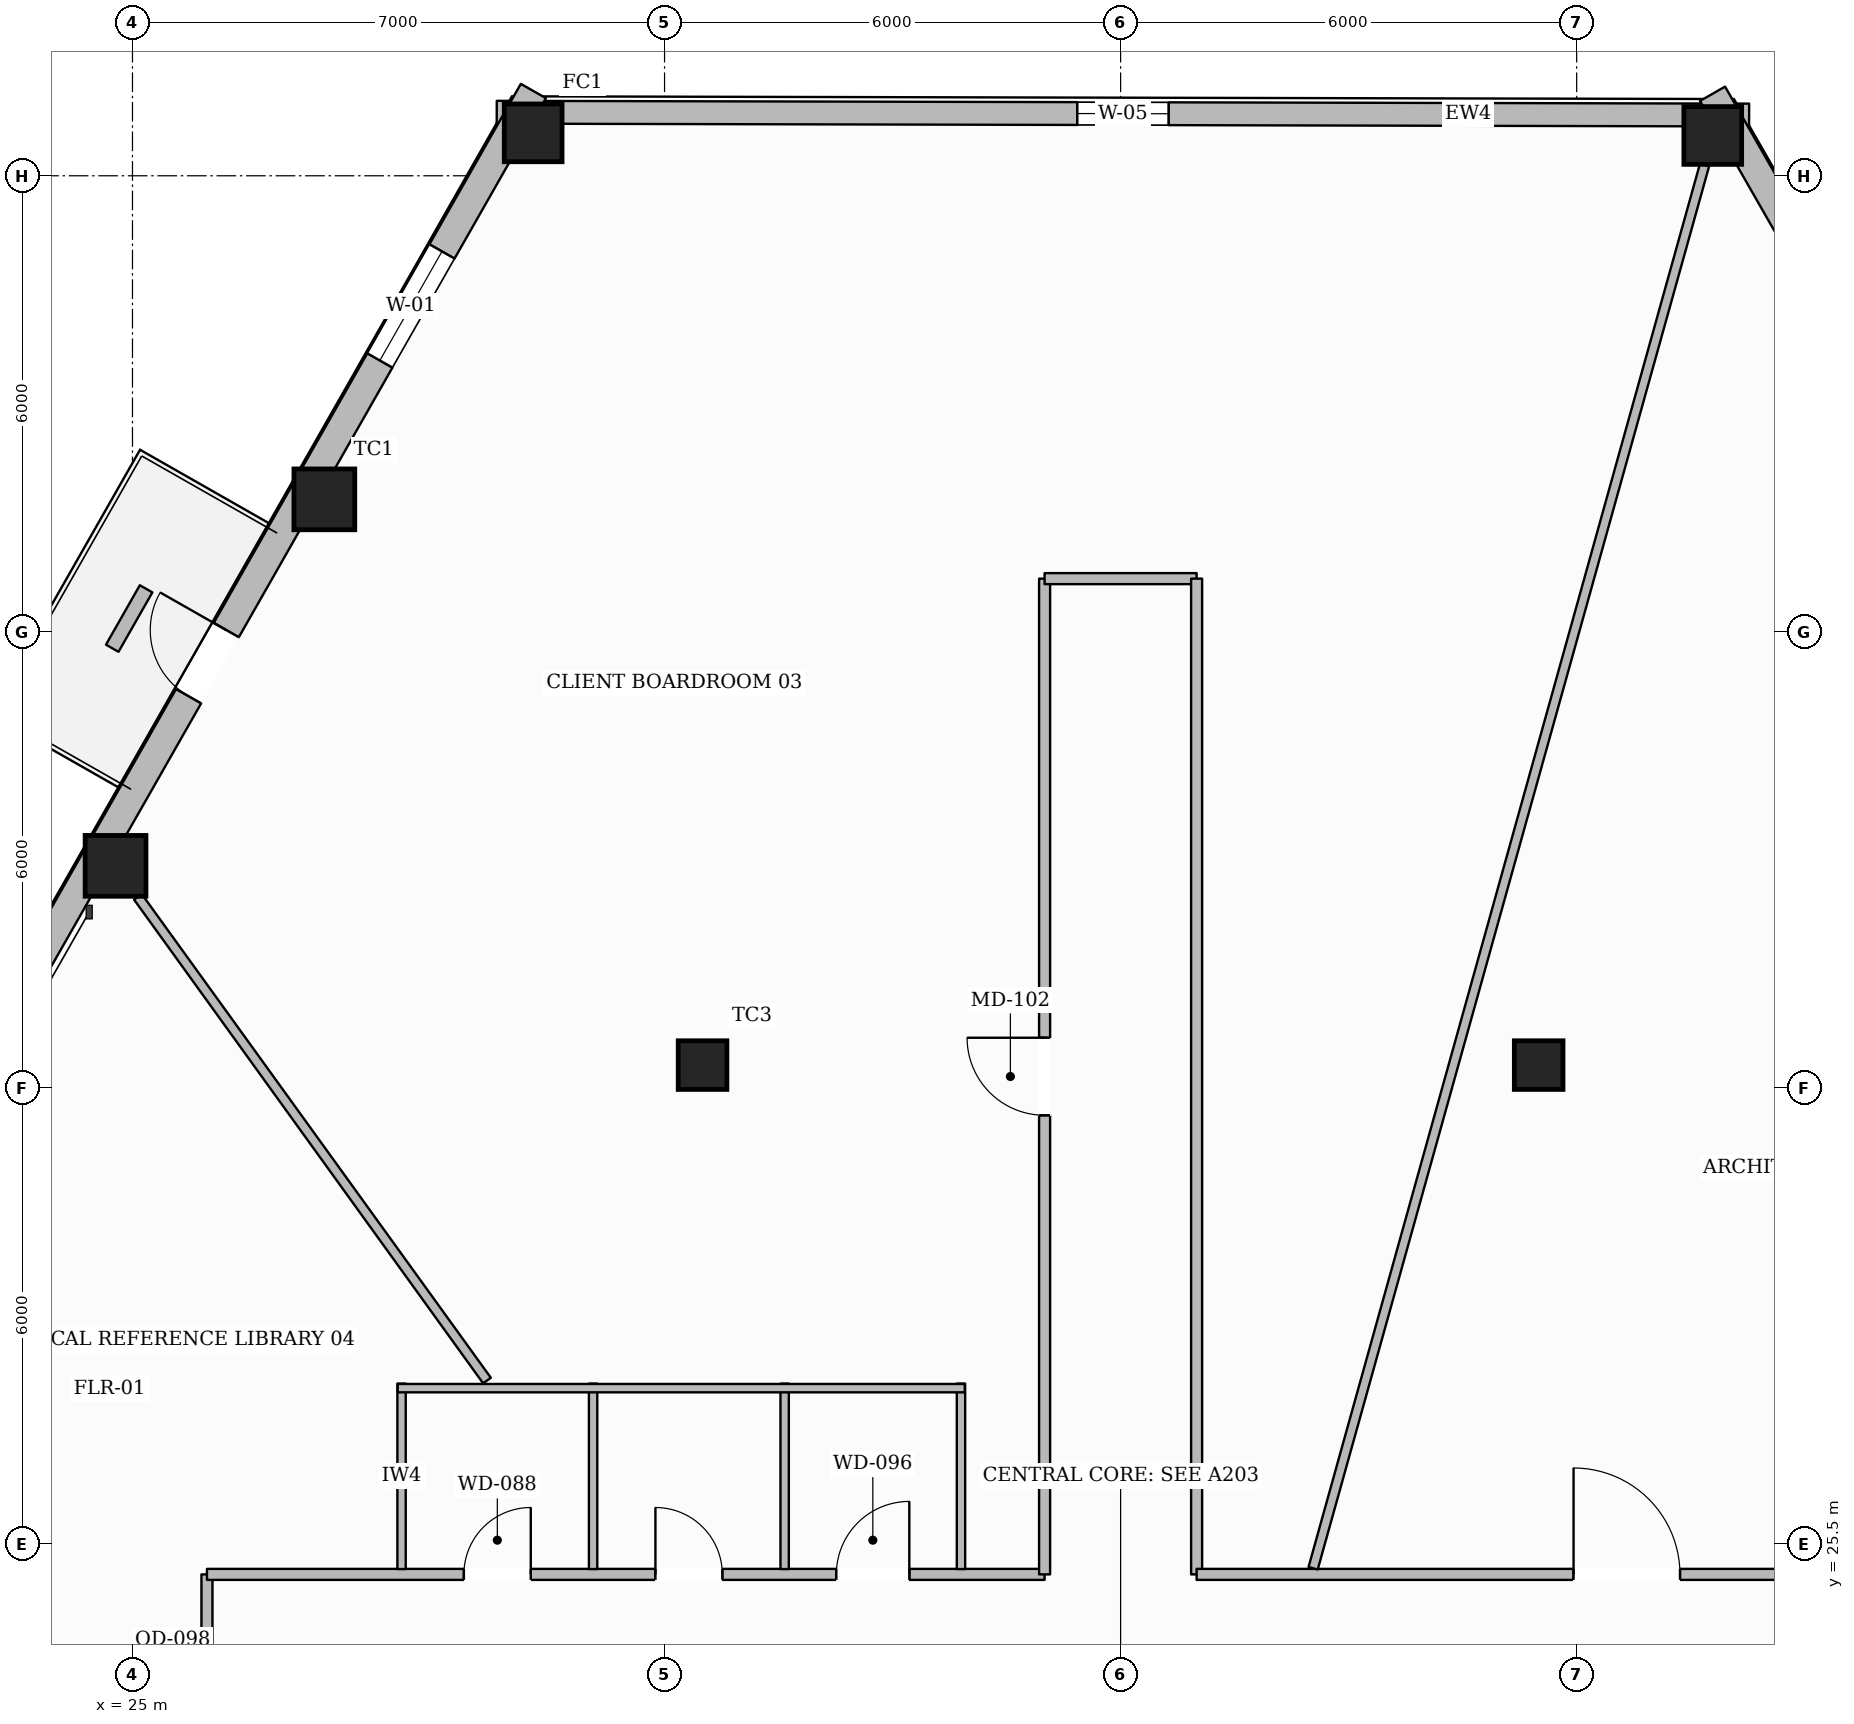
"""IFC4 building model, lengths in metres.
Left out: names, types, materials, properties, quantities, classifications, styles, units other than length and angle.
Written with IfcOpenShell. Run it as: python <this file> out.ifc"""

import sys

from ifc_helpers import new_model, si_unit, direction, frame, frame_2d, origin, origin_2d, place, context, subcontext, project, spatial, rectangle, hollow_rectangle, extrude, element, fill, save


model = new_model("IFC4")
c1 = context("Model", 3, precision=1e-05, world=origin(), true_north=direction((0.0, 1.0)))
c2 = subcontext(c1, "Body", "Model", "MODEL_VIEW")
j1 = project(units=[si_unit("LENGTHUNIT", "METRE"), si_unit("PLANEANGLEUNIT", "RADIAN")], contexts=[c1])
p1 = place(None, origin())
s1 = spatial("IfcSite", under=j1, at=p1, CompositionType="ELEMENT")
p2 = place(p1, origin())
s2 = spatial("IfcBuilding", under=s1, at=p2, CompositionType="ELEMENT")
p3 = place(p2, frame((0.0, 0.0, 32.95)))
s3 = spatial("IfcBuildingStorey", under=s2, at=p3, CompositionType="ELEMENT", Elevation=32.95)
p4 = place(p3, frame((30.271, 44.065, 0.0), z_axis=(0.0, 0.0, 1.0), x_axis=(1.0, 0.0, 0.0)))
e1 = element("IfcColumn", 1, at=p4, inside=s3, PredefinedType="COLUMN", context=c2, shape_type="SweptSolid", body=[
    extrude(hollow_rectangle(XDim=0.76, YDim=0.76, WallThickness=0.035, at=origin_2d()), origin(), (0.0, 0.0, 1.0), 3.59),
])
for number, where, z_axis, x_axis in (
    (2, (27.524, 39.243, 0.0), (0.0, 0.0, 1.0), (1.0, 0.0, 0.0)),
    (3, (24.777, 34.421, 0.0), (0.0, 0.0, 1.0), (1.0, 0.0, 0.0)),
):
    element("IfcColumn", number, at=place(p3, frame(where, z_axis=z_axis, x_axis=x_axis)), inside=s3, PredefinedType="COLUMN", context=c2, shape_type="SweptSolid", body=[
        extrude(hollow_rectangle(XDim=0.8, YDim=0.8, WallThickness=0.036, at=origin_2d()), origin(), (0.0, 0.0, 1.0), 3.59),
    ])
p5 = place(p3, frame((45.791, 44.03, 0.0), z_axis=(0.0, 0.0, 1.0), x_axis=(1.0, 0.0, 0.0)))
e4 = element("IfcColumn", 4, at=p5, inside=s3, PredefinedType="COLUMN", context=c2, shape_type="SweptSolid", body=[
    extrude(hollow_rectangle(XDim=0.76, YDim=0.76, WallThickness=0.035, at=origin_2d()), origin(), (0.0, 0.0, 1.0), 3.59),
])
for number, where, z_axis, x_axis in (
    (5, (32.5, 31.8, 0.0), (0.0, 0.0, 1.0), (1.0, 0.0, 0.0)),
    (6, (43.5, 31.8, 0.0), (0.0, 0.0, 1.0), (1.0, 0.0, 0.0)),
):
    element("IfcColumn", number, at=place(p3, frame(where, z_axis=z_axis, x_axis=x_axis)), inside=s3, PredefinedType="COLUMN", context=c2, shape_type="SweptSolid", body=[
        extrude(hollow_rectangle(XDim=0.64, YDim=0.64, WallThickness=0.028, at=origin_2d()), origin(), (0.0, 0.0, 1.0), 3.59),
    ])
p6 = place(p3, frame((29.792, 44.336, 0.0), z_axis=(0.0, 0.0, 1.0), x_axis=(0.999997529995, -0.002222611864, 0.0)))
e7 = element("IfcWall", 7, at=p6, inside=s3, PredefinedType="STANDARD", context=c2, shape_type="SweptSolid", body=[
    extrude(rectangle(XDim=16.477, YDim=0.3, at=frame_2d((8.238, 0.0))), origin(), (0.0, 0.0, 1.0), 2.97),
])
p7 = place(p6, frame((7.638, 0.0, 0.65)))
e8 = element("IfcOpeningElement", 8, at=p7, cuts=e7, PredefinedType="OPENING", context=c2, shape_type="SweptSolid", body=[
    extrude(rectangle(XDim=1.2, YDim=1.7, at=frame_2d((0.6, 0.85))), frame((0.0, 0.16, 0.0), z_axis=(0.0, -1.0, 0.0), x_axis=(1.0, 0.0, 0.0)), (0.0, 0.0, 1.0), 0.32),
])
p8 = place(p3, frame((13.32, 14.856, 0.0), z_axis=(0.0, 0.0, 1.0), x_axis=(0.495031565758, 0.868874990378, 0.0)))
e9 = element("IfcWall", 9, at=p8, inside=s3, PredefinedType="STANDARD", context=c2, shape_type="SweptSolid", body=[
    extrude(rectangle(XDim=34.25, YDim=0.38, at=frame_2d((17.125, 0.0))), origin(), (0.0, 0.0, 1.0), 2.97),
])
p9 = place(p8, frame((25.087, 0.0, 0.0)))
e10 = element("IfcOpeningElement", 10, at=p9, cuts=e9, PredefinedType="OPENING", context=c2, shape_type="SweptSolid", body=[
    extrude(rectangle(XDim=1.0, YDim=2.2, at=frame_2d((0.5, 1.1))), frame((0.0, 0.2, 0.0), z_axis=(0.0, -1.0, 0.0), x_axis=(1.0, 0.0, 0.0)), (0.0, 0.0, 1.0), 0.4),
])
p10 = place(p8, frame((30.17, 0.0, 0.65)))
e11 = element("IfcOpeningElement", 11, at=p10, cuts=e9, PredefinedType="OPENING", context=c2, shape_type="SweptSolid", body=[
    extrude(rectangle(XDim=1.65, YDim=1.75, at=frame_2d((0.825, 0.875))), frame((0.0, 0.2, 0.0), z_axis=(0.0, -1.0, 0.0), x_axis=(1.0, 0.0, 0.0)), (0.0, 0.0, 1.0), 0.4),
])
p11 = place(p8, frame((7.973, 0.0, 0.65)))
e12 = element("IfcOpeningElement", 12, at=p11, cuts=e9, PredefinedType="OPENING", context=c2, shape_type="SweptSolid", body=[
    extrude(rectangle(XDim=1.65, YDim=1.75, at=frame_2d((0.825, 0.875))), frame((0.0, 0.2, 0.0), z_axis=(0.0, -1.0, 0.0), x_axis=(1.0, 0.0, 0.0)), (0.0, 0.0, 1.0), 0.4),
])
p12 = place(p8, frame((2.424, 0.0, 0.65)))
e13 = element("IfcOpeningElement", 13, at=p12, cuts=e9, PredefinedType="OPENING", context=c2, shape_type="SweptSolid", body=[
    extrude(rectangle(XDim=1.65, YDim=1.75, at=frame_2d((0.825, 0.875))), frame((0.0, 0.2, 0.0), z_axis=(0.0, -1.0, 0.0), x_axis=(1.0, 0.0, 0.0)), (0.0, 0.0, 1.0), 0.4),
])
p13 = place(p3, frame((45.788, 44.579, 0.0), z_axis=(0.0, 0.0, 1.0), x_axis=(0.49695855075, -0.867774278736, 0.0)))
e14 = element("IfcWall", 14, at=p13, inside=s3, PredefinedType="STANDARD", context=c2, shape_type="SweptSolid", body=[
    extrude(rectangle(XDim=34.379, YDim=0.38, at=frame_2d((17.189, 0.0))), origin(), (0.0, 0.0, 1.0), 2.97),
])
p14 = place(p13, frame((25.184, 0.0, 0.0)))
e15 = element("IfcOpeningElement", 15, at=p14, cuts=e14, PredefinedType="OPENING", context=c2, shape_type="SweptSolid", body=[
    extrude(rectangle(XDim=1.0, YDim=2.2, at=frame_2d((0.5, 1.1))), frame((0.0, 0.2, 0.0), z_axis=(0.0, -1.0, 0.0), x_axis=(1.0, 0.0, 0.0)), (0.0, 0.0, 1.0), 0.4),
])
p15 = place(p13, frame((30.294, 0.0, 0.65)))
e16 = element("IfcOpeningElement", 16, at=p15, cuts=e14, PredefinedType="OPENING", context=c2, shape_type="SweptSolid", body=[
    extrude(rectangle(XDim=1.65, YDim=1.75, at=frame_2d((0.825, 0.875))), frame((0.0, 0.2, 0.0), z_axis=(0.0, -1.0, 0.0), x_axis=(1.0, 0.0, 0.0)), (0.0, 0.0, 1.0), 0.4),
])
p16 = place(p13, frame((19.152, 0.0, 0.65)))
e17 = element("IfcOpeningElement", 17, at=p16, cuts=e14, PredefinedType="OPENING", context=c2, shape_type="SweptSolid", body=[
    extrude(rectangle(XDim=1.65, YDim=1.75, at=frame_2d((0.825, 0.875))), frame((0.0, 0.2, 0.0), z_axis=(0.0, -1.0, 0.0), x_axis=(1.0, 0.0, 0.0)), (0.0, 0.0, 1.0), 0.4),
])
p17 = place(p13, frame((8.01, 0.0, 0.65)))
e18 = element("IfcOpeningElement", 18, at=p17, cuts=e14, PredefinedType="OPENING", context=c2, shape_type="SweptSolid", body=[
    extrude(rectangle(XDim=1.65, YDim=1.75, at=frame_2d((0.825, 0.875))), frame((0.0, 0.2, 0.0), z_axis=(0.0, -1.0, 0.0), x_axis=(1.0, 0.0, 0.0)), (0.0, 0.0, 1.0), 0.4),
])
p18 = place(p13, frame((2.438, 0.0, 0.65)))
e19 = element("IfcOpeningElement", 19, at=p18, cuts=e14, PredefinedType="OPENING", context=c2, shape_type="SweptSolid", body=[
    extrude(rectangle(XDim=1.65, YDim=1.75, at=frame_2d((0.825, 0.875))), frame((0.0, 0.2, 0.0), z_axis=(0.0, -1.0, 0.0), x_axis=(1.0, 0.0, 0.0)), (0.0, 0.0, 1.0), 0.4),
])
p19 = place(p3, frame((25.179, 38.066, 0.0), z_axis=(0.0, 0.0, 1.0), x_axis=(-0.49485284563, -0.868976789777, 0.0)))
e20 = element("IfcWall", 20, at=p19, inside=s3, PredefinedType="USERDEFINED", context=c2, shape_type="SweptSolid", body=[
    extrude(rectangle(XDim=0.9, YDim=0.19, at=frame_2d((0.45, 0.0))), origin(), (0.0, 0.0, 1.0), 0.5),
])
p20 = place(p3, frame((25.98, 9.1, 0.0), z_axis=(0.0, 0.0, 1.0), x_axis=(0.0, 1.0, 0.0)))
e21 = element("IfcWall", 21, at=p20, inside=s3, PredefinedType="PARTITIONING", context=c2, shape_type="SweptSolid", body=[
    extrude(rectangle(XDim=16.0, YDim=0.145, at=frame_2d((8.0, 0.0))), origin(), (0.0, 0.0, 1.0), 3.278),
])
p21 = place(p20, frame((13.93, 0.0, 0.0)))
e22 = element("IfcOpeningElement", 22, at=p21, cuts=e21, PredefinedType="OPENING", context=c2, shape_type="SweptSolid", body=[
    extrude(rectangle(XDim=0.98, YDim=2.15, at=frame_2d((0.49, 1.075))), frame((0.0, 0.083, 0.0), z_axis=(0.0, -1.0, 0.0), x_axis=(1.0, 0.0, 0.0)), (0.0, 0.0, 1.0), 0.165),
])
p22 = place(p20, frame((7.595, 0.0, 0.0)))
e23 = element("IfcOpeningElement", 23, at=p22, cuts=e21, PredefinedType="OPENING", context=c2, shape_type="SweptSolid", body=[
    extrude(rectangle(XDim=1.4, YDim=2.2, at=frame_2d((0.7, 1.1))), frame((0.0, 0.083, 0.0), z_axis=(0.0, -1.0, 0.0), x_axis=(1.0, 0.0, 0.0)), (0.0, 0.0, 1.0), 0.165),
])
p23 = place(p3, frame((25.98, 25.1, 0.0), z_axis=(0.0, 0.0, 1.0), x_axis=(1.0, 0.0, 0.0)))
e24 = element("IfcWall", 24, at=p23, inside=s3, PredefinedType="PARTITIONING", context=c2, shape_type="SweptSolid", body=[
    extrude(rectangle(XDim=11.02, YDim=0.145, at=frame_2d((5.51, 0.0))), origin(), (0.0, 0.0, 1.0), 3.59),
])
p24 = place(p23, frame((3.38, 0.0, 0.0)))
e25 = element("IfcOpeningElement", 25, at=p24, cuts=e24, PredefinedType="OPENING", context=c2, shape_type="SweptSolid", body=[
    extrude(rectangle(XDim=0.88, YDim=2.1, at=frame_2d((0.44, 1.05))), frame((0.0, 0.083, 0.0), z_axis=(0.0, -1.0, 0.0), x_axis=(1.0, 0.0, 0.0)), (0.0, 0.0, 1.0), 0.165),
])
p25 = place(p23, frame((5.9, 0.0, 0.0)))
e26 = element("IfcOpeningElement", 26, at=p25, cuts=e24, PredefinedType="OPENING", context=c2, shape_type="SweptSolid", body=[
    extrude(rectangle(XDim=0.88, YDim=2.1, at=frame_2d((0.44, 1.05))), frame((0.0, 0.083, 0.0), z_axis=(0.0, -1.0, 0.0), x_axis=(1.0, 0.0, 0.0)), (0.0, 0.0, 1.0), 0.165),
])
p26 = place(p23, frame((8.28, 0.0, 0.0)))
e27 = element("IfcOpeningElement", 27, at=p26, cuts=e24, PredefinedType="OPENING", context=c2, shape_type="SweptSolid", body=[
    extrude(rectangle(XDim=0.96, YDim=2.1, at=frame_2d((0.48, 1.05))), frame((0.0, 0.083, 0.0), z_axis=(0.0, -1.0, 0.0), x_axis=(1.0, 0.0, 0.0)), (0.0, 0.0, 1.0), 0.165),
])
p27 = place(p3, frame((37.0, 25.1, 0.0), z_axis=(0.0, 0.0, 1.0), x_axis=(0.0, 1.0, 0.0)))
e28 = element("IfcWall", 28, at=p27, inside=s3, PredefinedType="PARTITIONING", context=c2, shape_type="SweptSolid", body=[
    extrude(rectangle(XDim=13.1, YDim=0.145, at=frame_2d((6.55, 0.0))), origin(), (0.0, 0.0, 1.0), 3.59),
])
p28 = place(p27, frame((6.04, 0.0, 0.0)))
e29 = element("IfcOpeningElement", 29, at=p28, cuts=e28, PredefinedType="OPENING", context=c2, shape_type="SweptSolid", body=[
    extrude(rectangle(XDim=1.02, YDim=2.15, at=frame_2d((0.51, 1.075))), frame((0.0, 0.083, 0.0), z_axis=(0.0, -1.0, 0.0), x_axis=(1.0, 0.0, 0.0)), (0.0, 0.0, 1.0), 0.165),
])
p29 = place(p3, frame((37.0, 38.2, 0.0), z_axis=(0.0, 0.0, 1.0), x_axis=(1.0, 0.0, 0.0)))
e30 = element("IfcWall", 30, at=p29, inside=s3, PredefinedType="PARTITIONING", context=c2, shape_type="SweptSolid", body=[
    extrude(rectangle(XDim=2.0, YDim=0.145, at=frame_2d((1.0, 0.0))), origin(), (0.0, 0.0, 1.0), 3.59),
])
p30 = place(p3, frame((39.0, 38.2, 0.0), z_axis=(0.0, 0.0, 1.0), x_axis=(0.0, -1.0, 0.0)))
e31 = element("IfcWall", 31, at=p30, inside=s3, PredefinedType="PARTITIONING", context=c2, shape_type="SweptSolid", body=[
    extrude(rectangle(XDim=13.1, YDim=0.145, at=frame_2d((6.55, 0.0))), origin(), (0.0, 0.0, 1.0), 3.59),
])
p31 = place(p3, frame((39.0, 25.1, 0.0), z_axis=(0.0, 0.0, 1.0), x_axis=(1.0, 0.0, 0.0)))
e32 = element("IfcWall", 32, at=p31, inside=s3, PredefinedType="PARTITIONING", context=c2, shape_type="SweptSolid", body=[
    extrude(rectangle(XDim=11.02, YDim=0.145, at=frame_2d((5.51, 0.0))), origin(), (0.0, 0.0, 1.0), 3.59),
])
p32 = place(p31, frame((4.959, 0.0, 0.0)))
e33 = element("IfcOpeningElement", 33, at=p32, cuts=e32, PredefinedType="OPENING", context=c2, shape_type="SweptSolid", body=[
    extrude(rectangle(XDim=1.4, YDim=2.2, at=frame_2d((0.7, 1.1))), frame((0.0, 0.083, 0.0), z_axis=(0.0, -1.0, 0.0), x_axis=(1.0, 0.0, 0.0)), (0.0, 0.0, 1.0), 0.165),
])
for number, where, z_axis, x_axis in (
    (34, (28.54, 25.17, 0.0), (0.0, 0.0, 1.0), (0.0, 1.0, 0.0)),
    (35, (31.06, 25.17, 0.0), (0.0, 0.0, 1.0), (0.0, 1.0, 0.0)),
    (36, (33.58, 25.17, 0.0), (0.0, 0.0, 1.0), (0.0, 1.0, 0.0)),
    (37, (35.9, 25.17, 0.0), (0.0, 0.0, 1.0), (0.0, 1.0, 0.0)),
):
    element("IfcWall", number, at=place(p3, frame(where, z_axis=z_axis, x_axis=x_axis)), inside=s3, PredefinedType="PLUMBINGWALL", context=c2, shape_type="SweptSolid", body=[
        extrude(rectangle(XDim=2.44, YDim=0.11, at=frame_2d((1.22, 0.0))), origin(), (0.0, 0.0, 1.0), 3.59),
    ])
p33 = place(p3, frame((28.49, 27.55, 0.0), z_axis=(0.0, 0.0, 1.0), x_axis=(1.0, 0.0, 0.0)))
e38 = element("IfcWall", 38, at=p33, inside=s3, PredefinedType="PLUMBINGWALL", context=c2, shape_type="SweptSolid", body=[
    extrude(rectangle(XDim=7.46, YDim=0.11, at=frame_2d((3.73, 0.0))), origin(), (0.0, 0.0, 1.0), 3.59),
])
p34 = place(p3, frame((40.533, 25.18, 0.0), z_axis=(0.0, 0.0, 1.0), x_axis=(0.26868106489, 0.963229196697, 0.0)))
e39 = element("IfcWall", 39, at=p34, inside=s3, PredefinedType="PARTITIONING", context=c2, shape_type="SweptSolid", body=[
    extrude(rectangle(XDim=19.167, YDim=0.125, at=frame_2d((9.583, 0.0))), origin(), (0.0, 0.0, 1.0), 3.59),
])
p35 = place(p3, frame((29.664, 27.65, 0.0), z_axis=(0.0, 0.0, 1.0), x_axis=(-0.585209960971, 0.810881804939, 0.0)))
e40 = element("IfcWall", 40, at=p35, inside=s3, PredefinedType="PARTITIONING", context=c2, shape_type="SweptSolid", body=[
    extrude(rectangle(XDim=7.848, YDim=0.125, at=frame_2d((3.924, 0.0))), origin(), (0.0, 0.0, 1.0), 3.057),
])
p36 = place(p3, frame((25.899, 21.71, 0.0), z_axis=(0.0, 0.0, 1.0), x_axis=(-0.907224939094, 0.420645824757, 0.0)))
e41 = element("IfcWall", 41, at=p36, inside=s3, PredefinedType="PARTITIONING", context=c2, shape_type="SweptSolid", body=[
    extrude(rectangle(XDim=6.843, YDim=0.125, at=frame_2d((3.421, 0.0))), origin(), (0.0, 0.0, 1.0), 3.057),
])
p37 = place(p9, origin())
e42 = element("IfcDoor", 42, at=p37, inside=s3, OperationType="SINGLE_SWING_RIGHT", PredefinedType="DOOR", context=c2, shape_type="SweptSolid", body=[
    extrude(rectangle(XDim=1.0, YDim=2.2, at=frame_2d((0.5, 1.1))), frame((0.0, 0.025, 0.0), z_axis=(0.0, -1.0, 0.0), x_axis=(1.0, 0.0, 0.0)), (0.0, 0.0, 1.0), 0.05),
])
fill(e10, e42)
p38 = place(p10, origin())
e43 = element("IfcWindow", 43, at=p38, inside=s3, PartitioningType="SINGLE_PANEL", PredefinedType="WINDOW", context=c2, shape_type="SweptSolid", body=[
    extrude(rectangle(XDim=1.65, YDim=1.75, at=frame_2d((0.825, 0.875))), frame((0.0, 0.03, 0.0), z_axis=(0.0, -1.0, 0.0), x_axis=(1.0, 0.0, 0.0)), (0.0, 0.0, 1.0), 0.06),
])
fill(e11, e43)
p39 = place(p7, origin())
e44 = element("IfcWindow", 44, at=p39, inside=s3, PartitioningType="SINGLE_PANEL", PredefinedType="WINDOW", context=c2, shape_type="SweptSolid", body=[
    extrude(rectangle(XDim=1.2, YDim=1.7, at=frame_2d((0.6, 0.85))), frame((0.0, 0.03, 0.0), z_axis=(0.0, -1.0, 0.0), x_axis=(1.0, 0.0, 0.0)), (0.0, 0.0, 1.0), 0.06),
])
fill(e8, e44)
p40 = place(p24, origin())
e45 = element("IfcDoor", 45, at=p40, inside=s3, OperationType="SINGLE_SWING_RIGHT", PredefinedType="DOOR", context=c2, shape_type="SweptSolid", body=[
    extrude(rectangle(XDim=0.88, YDim=2.1, at=frame_2d((0.44, 1.05))), frame((0.0, 0.025, 0.0), z_axis=(0.0, -1.0, 0.0), x_axis=(1.0, 0.0, 0.0)), (0.0, 0.0, 1.0), 0.05),
])
fill(e25, e45)
p41 = place(p25, origin())
e46 = element("IfcDoor", 46, at=p41, inside=s3, OperationType="SINGLE_SWING_LEFT", PredefinedType="DOOR", context=c2, shape_type="SweptSolid", body=[
    extrude(rectangle(XDim=0.88, YDim=2.1, at=frame_2d((0.44, 1.05))), frame((0.0, 0.025, 0.0), z_axis=(0.0, -1.0, 0.0), x_axis=(1.0, 0.0, 0.0)), (0.0, 0.0, 1.0), 0.05),
])
fill(e26, e46)
p42 = place(p26, origin())
e47 = element("IfcDoor", 47, at=p42, inside=s3, OperationType="SINGLE_SWING_RIGHT", PredefinedType="DOOR", context=c2, shape_type="SweptSolid", body=[
    extrude(rectangle(XDim=0.96, YDim=2.1, at=frame_2d((0.48, 1.05))), frame((0.0, 0.025, 0.0), z_axis=(0.0, -1.0, 0.0), x_axis=(1.0, 0.0, 0.0)), (0.0, 0.0, 1.0), 0.05),
])
fill(e27, e47)
p43 = place(p32, origin())
e48 = element("IfcDoor", 48, at=p43, inside=s3, OperationType="SINGLE_SWING_LEFT", PredefinedType="DOOR", context=c2, shape_type="SweptSolid", body=[
    extrude(rectangle(XDim=1.4, YDim=2.2, at=frame_2d((0.7, 1.1))), frame((0.0, 0.025, 0.0), z_axis=(0.0, -1.0, 0.0), x_axis=(1.0, 0.0, 0.0)), (0.0, 0.0, 1.0), 0.05),
])
fill(e33, e48)
p44 = place(p28, origin())
e49 = element("IfcDoor", 49, at=p44, inside=s3, OperationType="SINGLE_SWING_RIGHT", PredefinedType="DOOR", context=c2, shape_type="SweptSolid", body=[
    extrude(rectangle(XDim=1.02, YDim=2.15, at=frame_2d((0.51, 1.075))), frame((0.0, 0.025, 0.0), z_axis=(0.0, -1.0, 0.0), x_axis=(1.0, 0.0, 0.0)), (0.0, 0.0, 1.0), 0.05),
])
fill(e29, e49)
save(model, sys.argv[1])
